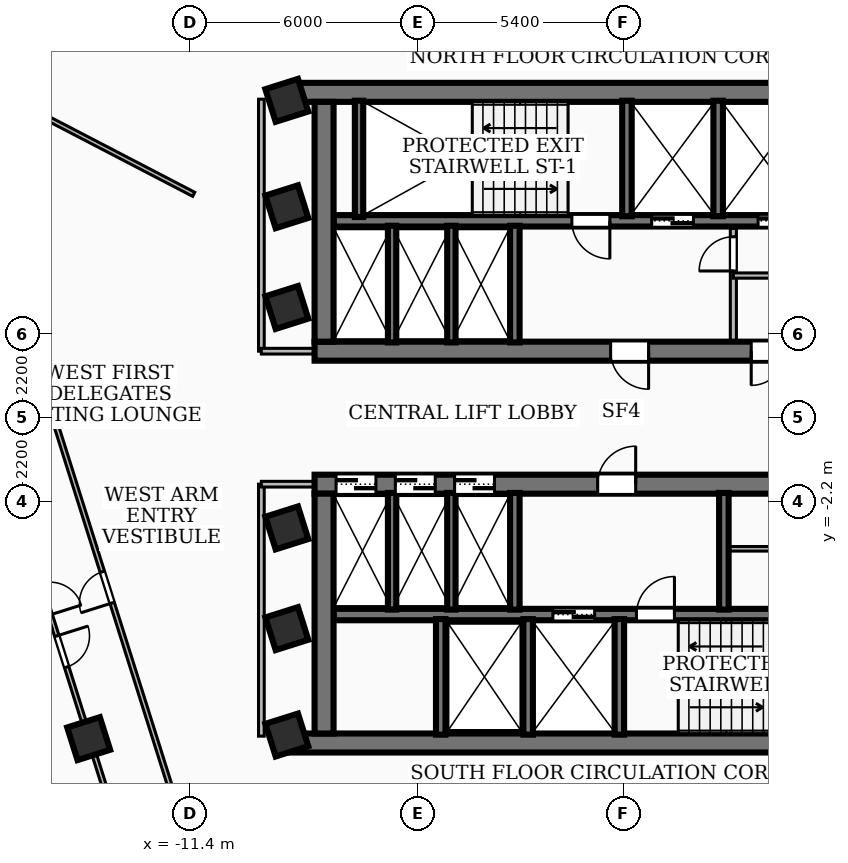
"""IFC4 building model, lengths in metres.
Left out: names, types, materials, properties, quantities, classifications, styles, units other than length and angle.
Written with IfcOpenShell. Run it as: python <this file> out.ifc"""

import sys

from ifc_helpers import new_model, si_unit, direction, frame, frame_2d, origin, origin_2d, place, context, subcontext, project, spatial, rectangle, extrude, element, fill, save


model = new_model("IFC4")
c1 = context("Model", 3, precision=1e-05, world=origin(), true_north=direction((0.0, 1.0)))
c2 = subcontext(c1, "Body", "Model", "MODEL_VIEW")
j1 = project(units=[si_unit("LENGTHUNIT", "METRE"), si_unit("PLANEANGLEUNIT", "RADIAN")], contexts=[c1])
p1 = place(None, origin())
s1 = spatial("IfcSite", under=j1, at=p1, CompositionType="ELEMENT")
p2 = place(p1, origin())
s2 = spatial("IfcBuilding", under=s1, at=p2, CompositionType="ELEMENT")
p3 = place(p2, frame((0.0, 0.0, 152.28)))
s3 = spatial("IfcBuildingStorey", under=s2, at=p3, CompositionType="ELEMENT", Elevation=152.28)
p4 = place(p3, frame((-8.78, 8.56, 0.0), z_axis=(0.0, 0.0, 1.0), x_axis=(1.0, 0.0, 0.0)))
e1 = element("IfcWall", 1, at=p4, inside=s3, PredefinedType="SHEAR", context=c2, shape_type="SweptSolid", body=[
    extrude(rectangle(XDim=17.56, YDim=0.5, at=frame_2d((8.78, 0.0))), origin(), (0.0, 0.0, 1.0), 3.34),
])
p5 = place(p3, frame((8.12, 1.75, 0.0), z_axis=(0.0, 0.0, 1.0), x_axis=(-1.0, 0.0, 0.0)))
e2 = element("IfcWall", 2, at=p5, inside=s3, PredefinedType="SHEAR", context=c2, shape_type="SweptSolid", body=[
    extrude(rectangle(XDim=16.24, YDim=0.5, at=frame_2d((8.12, 0.0))), origin(), (0.0, 0.0, 1.0), 3.34),
])
p6 = place(p5, frame((7.45, 0.0, 0.0)))
e3 = element("IfcOpeningElement", 3, at=p6, cuts=e2, PredefinedType="OPENING", context=c2, shape_type="SweptSolid", body=[
    extrude(rectangle(XDim=1.0, YDim=2.1, at=frame_2d((0.5, 1.05))), frame((0.0, 0.26, 0.0), z_axis=(0.0, -1.0, 0.0), x_axis=(1.0, 0.0, 0.0)), (0.0, 0.0, 1.0), 0.52),
])
p7 = place(p5, frame((3.85, 0.0, 0.0)))
e4 = element("IfcOpeningElement", 4, at=p7, cuts=e2, PredefinedType="OPENING", context=c2, shape_type="SweptSolid", body=[
    extrude(rectangle(XDim=0.9, YDim=2.06, at=frame_2d((0.45, 1.03))), frame((0.0, 0.26, 0.0), z_axis=(0.0, -1.0, 0.0), x_axis=(1.0, 0.0, 0.0)), (0.0, 0.0, 1.0), 0.52),
])
p8 = place(p5, frame((2.35, 0.0, 0.0)))
e5 = element("IfcOpeningElement", 5, at=p8, cuts=e2, PredefinedType="OPENING", context=c2, shape_type="SweptSolid", body=[
    extrude(rectangle(XDim=0.9, YDim=2.06, at=frame_2d((0.45, 1.03))), frame((0.0, 0.26, 0.0), z_axis=(0.0, -1.0, 0.0), x_axis=(1.0, 0.0, 0.0)), (0.0, 0.0, 1.0), 0.52),
])
p9 = place(p5, frame((0.8, 0.0, 0.0)))
e6 = element("IfcOpeningElement", 6, at=p9, cuts=e2, PredefinedType="OPENING", context=c2, shape_type="SweptSolid", body=[
    extrude(rectangle(XDim=0.9, YDim=2.06, at=frame_2d((0.45, 1.03))), frame((0.0, 0.26, 0.0), z_axis=(0.0, -1.0, 0.0), x_axis=(1.0, 0.0, 0.0)), (0.0, 0.0, 1.0), 0.52),
])
p10 = place(p3, frame((-7.87, 2.0, 0.0), z_axis=(0.0, 0.0, 1.0), x_axis=(0.0, 1.0, 0.0)))
e7 = element("IfcWall", 7, at=p10, inside=s3, PredefinedType="SHEAR", context=c2, shape_type="SweptSolid", body=[
    extrude(rectangle(XDim=6.31, YDim=0.5, at=frame_2d((3.155, 0.0))), origin(), (0.0, 0.0, 1.0), 3.34),
])
p11 = place(p3, frame((7.62, 5.18, 0.0), z_axis=(0.0, 0.0, 1.0), x_axis=(-1.0, 0.0, 0.0)))
e8 = element("IfcWall", 8, at=p11, inside=s3, PredefinedType="SOLIDWALL", context=c2, shape_type="SweptSolid", body=[
    extrude(rectangle(XDim=15.24, YDim=0.3, at=frame_2d((7.62, 0.0))), origin(), (0.0, 0.0, 1.0), 3.34),
])
p12 = place(p11, frame((5.77, 0.0, 0.0)))
e9 = element("IfcOpeningElement", 9, at=p12, cuts=e8, PredefinedType="OPENING", context=c2, shape_type="SweptSolid", body=[
    extrude(rectangle(XDim=1.1, YDim=2.15, at=frame_2d((0.55, 1.075))), frame((0.0, 0.16, 0.0), z_axis=(0.0, -1.0, 0.0), x_axis=(1.0, 0.0, 0.0)), (0.0, 0.0, 1.0), 0.32),
])
p13 = place(p11, frame((2.97, 0.0, 0.0)))
e10 = element("IfcOpeningElement", 10, at=p13, cuts=e8, PredefinedType="OPENING", context=c2, shape_type="SweptSolid", body=[
    extrude(rectangle(XDim=1.1, YDim=2.15, at=frame_2d((0.55, 1.075))), frame((0.0, 0.16, 0.0), z_axis=(0.0, -1.0, 0.0), x_axis=(1.0, 0.0, 0.0)), (0.0, 0.0, 1.0), 0.32),
])
p14 = place(p11, frame((7.97, 0.0, 0.0)))
e11 = element("IfcOpeningElement", 11, at=p14, cuts=e8, PredefinedType="OPENING", context=c2, shape_type="SweptSolid", body=[
    extrude(rectangle(XDim=1.0, YDim=2.1, at=frame_2d((0.5, 1.05))), frame((0.0, 0.16, 0.0), z_axis=(0.0, -1.0, 0.0), x_axis=(1.0, 0.0, 0.0)), (0.0, 0.0, 1.0), 0.32),
])
p15 = place(p3, frame((8.78, -8.56, 0.0), z_axis=(0.0, 0.0, 1.0), x_axis=(-1.0, 0.0, 0.0)))
e12 = element("IfcWall", 12, at=p15, inside=s3, PredefinedType="SHEAR", context=c2, shape_type="SweptSolid", body=[
    extrude(rectangle(XDim=17.56, YDim=0.5, at=frame_2d((8.78, 0.0))), origin(), (0.0, 0.0, 1.0), 3.34),
])
p16 = place(p3, frame((-8.12, -1.75, 0.0), z_axis=(0.0, 0.0, 1.0), x_axis=(1.0, 0.0, 0.0)))
e13 = element("IfcWall", 13, at=p16, inside=s3, PredefinedType="SHEAR", context=c2, shape_type="SweptSolid", body=[
    extrude(rectangle(XDim=16.24, YDim=0.5, at=frame_2d((8.12, 0.0))), origin(), (0.0, 0.0, 1.0), 3.34),
])
p17 = place(p16, frame((7.45, 0.0, 0.0)))
e14 = element("IfcOpeningElement", 14, at=p17, cuts=e13, PredefinedType="OPENING", context=c2, shape_type="SweptSolid", body=[
    extrude(rectangle(XDim=1.0, YDim=2.1, at=frame_2d((0.5, 1.05))), frame((0.0, 0.26, 0.0), z_axis=(0.0, -1.0, 0.0), x_axis=(1.0, 0.0, 0.0)), (0.0, 0.0, 1.0), 0.52),
])
p18 = place(p16, frame((12.65, 0.0, 0.0)))
e15 = element("IfcOpeningElement", 15, at=p18, cuts=e13, PredefinedType="OPENING", context=c2, shape_type="SweptSolid", body=[
    extrude(rectangle(XDim=0.9, YDim=2.06, at=frame_2d((0.45, 1.03))), frame((0.0, 0.26, 0.0), z_axis=(0.0, -1.0, 0.0), x_axis=(1.0, 0.0, 0.0)), (0.0, 0.0, 1.0), 0.52),
])
p19 = place(p16, frame((0.565, 0.0, 0.0)))
e16 = element("IfcOpeningElement", 16, at=p19, cuts=e13, PredefinedType="OPENING", context=c2, shape_type="SweptSolid", body=[
    extrude(rectangle(XDim=1.05, YDim=2.15, at=frame_2d((0.525, 1.075))), frame((0.0, 0.26, 0.0), z_axis=(0.0, -1.0, 0.0), x_axis=(1.0, 0.0, 0.0)), (0.0, 0.0, 1.0), 0.52),
])
p20 = place(p16, frame((2.125, 0.0, 0.0)))
e17 = element("IfcOpeningElement", 17, at=p20, cuts=e13, PredefinedType="OPENING", context=c2, shape_type="SweptSolid", body=[
    extrude(rectangle(XDim=1.05, YDim=2.15, at=frame_2d((0.525, 1.075))), frame((0.0, 0.26, 0.0), z_axis=(0.0, -1.0, 0.0), x_axis=(1.0, 0.0, 0.0)), (0.0, 0.0, 1.0), 0.52),
])
p21 = place(p16, frame((3.685, 0.0, 0.0)))
e18 = element("IfcOpeningElement", 18, at=p21, cuts=e13, PredefinedType="OPENING", context=c2, shape_type="SweptSolid", body=[
    extrude(rectangle(XDim=1.05, YDim=2.15, at=frame_2d((0.525, 1.075))), frame((0.0, 0.26, 0.0), z_axis=(0.0, -1.0, 0.0), x_axis=(1.0, 0.0, 0.0)), (0.0, 0.0, 1.0), 0.52),
])
p22 = place(p3, frame((-7.87, -8.31, 0.0), z_axis=(0.0, 0.0, 1.0), x_axis=(0.0, 1.0, 0.0)))
e19 = element("IfcWall", 19, at=p22, inside=s3, PredefinedType="SHEAR", context=c2, shape_type="SweptSolid", body=[
    extrude(rectangle(XDim=6.31, YDim=0.5, at=frame_2d((3.155, 0.0))), origin(), (0.0, 0.0, 1.0), 3.34),
])
p23 = place(p3, frame((-7.62, -5.18, 0.0), z_axis=(0.0, 0.0, 1.0), x_axis=(1.0, 0.0, 0.0)))
e20 = element("IfcWall", 20, at=p23, inside=s3, PredefinedType="SOLIDWALL", context=c2, shape_type="SweptSolid", body=[
    extrude(rectangle(XDim=15.24, YDim=0.3, at=frame_2d((7.62, 0.0))), origin(), (0.0, 0.0, 1.0), 3.34),
])
p24 = place(p23, frame((5.77, 0.0, 0.0)))
e21 = element("IfcOpeningElement", 21, at=p24, cuts=e20, PredefinedType="OPENING", context=c2, shape_type="SweptSolid", body=[
    extrude(rectangle(XDim=1.1, YDim=2.15, at=frame_2d((0.55, 1.075))), frame((0.0, 0.16, 0.0), z_axis=(0.0, -1.0, 0.0), x_axis=(1.0, 0.0, 0.0)), (0.0, 0.0, 1.0), 0.32),
])
p25 = place(p23, frame((7.97, 0.0, 0.0)))
e22 = element("IfcOpeningElement", 22, at=p25, cuts=e20, PredefinedType="OPENING", context=c2, shape_type="SweptSolid", body=[
    extrude(rectangle(XDim=1.0, YDim=2.1, at=frame_2d((0.5, 1.05))), frame((0.0, 0.16, 0.0), z_axis=(0.0, -1.0, 0.0), x_axis=(1.0, 0.0, 0.0)), (0.0, 0.0, 1.0), 0.32),
])
p26 = place(p3, frame((-6.95, 5.28, 0.0), z_axis=(0.0, 0.0, 1.0), x_axis=(0.0, 1.0, 0.0)))
e23 = element("IfcWall", 23, at=p26, inside=s3, PredefinedType="SOLIDWALL", context=c2, shape_type="SweptSolid", body=[
    extrude(rectangle(XDim=3.06, YDim=0.22, at=frame_2d((1.53, 0.0))), origin(), (0.0, 0.0, 1.0), 3.34),
])
for number, where, z_axis, x_axis in (
    (24, (0.1, 5.3, 0.0), (0.0, 0.0, 1.0), (0.0, 1.0, 0.0)),
    (25, (2.5, 5.3, 0.0), (0.0, 0.0, 1.0), (0.0, 1.0, 0.0)),
):
    element("IfcWall", number, at=place(p3, frame(where, z_axis=z_axis, x_axis=x_axis)), inside=s3, PredefinedType="SOLIDWALL", context=c2, shape_type="SweptSolid", body=[
        extrude(rectangle(XDim=3.04, YDim=0.25, at=frame_2d((1.52, 0.0))), origin(), (0.0, 0.0, 1.0), 3.34),
    ])
p27 = place(p3, frame((-2.85, 1.98, 0.0), z_axis=(0.0, 0.0, 1.0), x_axis=(0.0, 1.0, 0.0)))
e26 = element("IfcWall", 26, at=p27, inside=s3, PredefinedType="SOLIDWALL", context=c2, shape_type="SweptSolid", body=[
    extrude(rectangle(XDim=3.07, YDim=0.25, at=frame_2d((1.535, 0.0))), origin(), (0.0, 0.0, 1.0), 3.34),
])
for number, where, z_axis, x_axis in (
    (27, (-0.1, -8.34, 0.0), (0.0, 0.0, 1.0), (0.0, 1.0, 0.0)),
    (28, (-2.5, -8.34, 0.0), (0.0, 0.0, 1.0), (0.0, 1.0, 0.0)),
    (29, (-4.8, -8.34, 0.0), (0.0, 0.0, 1.0), (0.0, 1.0, 0.0)),
):
    element("IfcWall", number, at=place(p3, frame(where, z_axis=z_axis, x_axis=x_axis)), inside=s3, PredefinedType="SOLIDWALL", context=c2, shape_type="SweptSolid", body=[
        extrude(rectangle(XDim=3.04, YDim=0.25, at=frame_2d((1.52, 0.0))), origin(), (0.0, 0.0, 1.0), 3.34),
    ])
for number, where, z_axis, x_axis in (
    (30, (-2.85, -5.05, 0.0), (0.0, 0.0, 1.0), (0.0, 1.0, 0.0)),
    (31, (2.65, -5.05, 0.0), (0.0, 0.0, 1.0), (0.0, 1.0, 0.0)),
):
    element("IfcWall", number, at=place(p3, frame(where, z_axis=z_axis, x_axis=x_axis)), inside=s3, PredefinedType="SOLIDWALL", context=c2, shape_type="SweptSolid", body=[
        extrude(rectangle(XDim=3.07, YDim=0.25, at=frame_2d((1.535, 0.0))), origin(), (0.0, 0.0, 1.0), 3.34),
    ])
for number, where, z_axis, x_axis in (
    (32, (-6.08, 1.98, 0.0), (0.0, 0.0, 1.0), (0.0, 1.0, 0.0)),
    (33, (-4.52, 1.98, 0.0), (0.0, 0.0, 1.0), (0.0, 1.0, 0.0)),
    (34, (-6.08, -5.05, 0.0), (0.0, 0.0, 1.0), (0.0, 1.0, 0.0)),
    (35, (-4.52, -5.05, 0.0), (0.0, 0.0, 1.0), (0.0, 1.0, 0.0)),
):
    element("IfcWall", number, at=place(p3, frame(where, z_axis=z_axis, x_axis=x_axis)), inside=s3, PredefinedType="SOLIDWALL", context=c2, shape_type="SweptSolid", body=[
        extrude(rectangle(XDim=3.07, YDim=0.22, at=frame_2d((1.535, 0.0))), origin(), (0.0, 0.0, 1.0), 3.34),
    ])
for number, where, z_axis, x_axis in (
    (36, (-8.85, -5.55, 0.0), (0.0, 0.0, 1.0), (0.954, 0.301, 0.0)),
    (37, (-8.85, -2.9, 0.0), (0.0, 0.0, 1.0), (0.954, 0.301, 0.0)),
    (38, (-8.85, 2.9, 0.0), (0.0, 0.0, 1.0), (0.954, 0.301, 0.0)),
    (39, (-8.85, 5.55, 0.0), (0.0, 0.0, 1.0), (0.954, 0.301, 0.0)),
    (40, (-8.85, 8.35, 0.0), (0.0, 0.0, 1.0), (0.954, 0.301, 0.0)),
    (41, (-8.85, -8.35, 0.0), (0.0, 0.0, 1.0), (0.954, 0.301, 0.0)),
    (42, (-14.064, -8.445, 0.0), (0.0, 0.0, 1.0), (0.954, 0.301, 0.0)),
):
    element("IfcColumn", number, at=place(p3, frame(where, z_axis=z_axis, x_axis=x_axis)), inside=s3, PredefinedType="COLUMN", context=c2, shape_type="SweptSolid", body=[
        extrude(rectangle(XDim=0.9, YDim=0.9, at=origin_2d()), origin(), (0.0, 0.0, 1.0), 3.6),
    ])
p28 = place(p3, frame((2.9, 2.04, 0.0), z_axis=(0.0, 0.0, 1.0), x_axis=(0.0, 1.0, 0.0)))
e43 = element("IfcWall", 43, at=p28, inside=s3, PredefinedType="PARTITIONING", context=c2, shape_type="SweptSolid", body=[
    extrude(rectangle(XDim=2.94, YDim=0.16, at=frame_2d((1.47, 0.0))), origin(), (0.0, 0.0, 1.0), 2.57),
])
p29 = place(p28, frame((1.82, 0.0, 0.0)))
e44 = element("IfcOpeningElement", 44, at=p29, cuts=e43, PredefinedType="OPENING", context=c2, shape_type="SweptSolid", body=[
    extrude(rectangle(XDim=0.9, YDim=2.06, at=frame_2d((0.45, 1.03))), frame((0.0, 0.09, 0.0), z_axis=(0.0, -1.0, 0.0), x_axis=(1.0, 0.0, 0.0)), (0.0, 0.0, 1.0), 0.18),
])
p30 = place(p3, frame((2.9, 3.74, 0.0), z_axis=(0.0, 0.0, 1.0), x_axis=(1.0, 0.0, 0.0)))
e45 = element("IfcWall", 45, at=p30, inside=s3, PredefinedType="PARTITIONING", context=c2, shape_type="SweptSolid", body=[
    extrude(rectangle(XDim=4.65, YDim=0.138, at=frame_2d((2.325, 0.0))), origin(), (0.0, 0.0, 1.0), 3.34),
])
p31 = place(p3, frame((2.8, -3.45, 0.0), z_axis=(0.0, 0.0, 1.0), x_axis=(1.0, 0.0, 0.0)))
e46 = element("IfcWall", 46, at=p31, inside=s3, PredefinedType="PARTITIONING", context=c2, shape_type="SweptSolid", body=[
    extrude(rectangle(XDim=4.68, YDim=0.12, at=frame_2d((2.34, 0.0))), origin(), (0.0, 0.0, 1.0), 3.34),
])
p32 = place(p31, frame((1.9, 0.0, 0.0)))
e47 = element("IfcOpeningElement", 47, at=p32, cuts=e46, PredefinedType="OPENING", context=c2, shape_type="SweptSolid", body=[
    extrude(rectangle(XDim=0.86, YDim=2.04, at=frame_2d((0.43, 1.02))), frame((0.0, 0.07, 0.0), z_axis=(0.0, -1.0, 0.0), x_axis=(1.0, 0.0, 0.0)), (0.0, 0.0, 1.0), 0.14),
])
p33 = place(p3, frame((-9.52, 1.75, 0.0), z_axis=(0.0, 0.0, 1.0), x_axis=(0.0, 1.0, 0.0)))
e48 = element("IfcWall", 48, at=p33, inside=s3, PredefinedType="PARTITIONING", context=c2, shape_type="SweptSolid", body=[
    extrude(rectangle(XDim=6.63, YDim=0.15, at=frame_2d((3.315, 0.0))), origin(), (0.0, 0.0, 1.0), 2.152),
])
p34 = place(p3, frame((-7.85, 1.75, 0.0), z_axis=(0.0, 0.0, 1.0), x_axis=(-1.0, 0.0, 0.0)))
e49 = element("IfcWall", 49, at=p34, inside=s3, PredefinedType="PARTITIONING", context=c2, shape_type="SweptSolid", body=[
    extrude(rectangle(XDim=1.67, YDim=0.15, at=frame_2d((0.835, 0.0))), origin(), (0.0, 0.0, 1.0), 2.57),
])
p35 = place(p3, frame((-9.52, -8.38, 0.0), z_axis=(0.0, 0.0, 1.0), x_axis=(0.0, 1.0, 0.0)))
e50 = element("IfcWall", 50, at=p35, inside=s3, PredefinedType="PARTITIONING", context=c2, shape_type="SweptSolid", body=[
    extrude(rectangle(XDim=6.63, YDim=0.15, at=frame_2d((3.315, 0.0))), origin(), (0.0, 0.0, 1.0), 2.152),
])
p36 = place(p3, frame((-7.85, -1.75, 0.0), z_axis=(0.0, 0.0, 1.0), x_axis=(-1.0, 0.0, 0.0)))
e51 = element("IfcWall", 51, at=p36, inside=s3, PredefinedType="PARTITIONING", context=c2, shape_type="SweptSolid", body=[
    extrude(rectangle(XDim=1.67, YDim=0.15, at=frame_2d((0.835, 0.0))), origin(), (0.0, 0.0, 1.0), 2.57),
])
p37 = place(p3, frame((-11.3, 5.877, 0.0), z_axis=(0.0, 0.0, 1.0), x_axis=(-0.887198362964, 0.461388193123, 0.0)))
e52 = element("IfcWall", 52, at=p37, inside=s3, PredefinedType="PARTITIONING", context=c2, shape_type="SweptSolid", body=[
    extrude(rectangle(XDim=6.938, YDim=0.12, at=frame_2d((3.469, 0.0))), origin(), (0.0, 0.0, 1.0), 3.34),
])
p38 = place(p3, frame((-10.379, -14.591, 0.0), z_axis=(0.0, 0.0, 1.0), x_axis=(-0.301070726534, 0.95360181293, 0.0)))
e53 = element("IfcWall", 53, at=p38, inside=s3, PredefinedType="PARTITIONING", context=c2, shape_type="SweptSolid", body=[
    extrude(rectangle(XDim=20.81, YDim=0.12, at=frame_2d((10.405, 0.0))), origin(), (0.0, 0.0, 1.0), 2.152),
])
p39 = place(p38, frame((10.189, 0.0, 0.0)))
e54 = element("IfcOpeningElement", 54, at=p39, cuts=e53, PredefinedType="OPENING", context=c2, shape_type="SweptSolid", body=[
    extrude(rectangle(XDim=0.86, YDim=2.0, at=frame_2d((0.43, 1.0))), frame((0.0, 0.07, 0.0), z_axis=(0.0, -1.0, 0.0), x_axis=(1.0, 0.0, 0.0)), (0.0, 0.0, 1.0), 0.14),
])
p40 = place(p3, frame((-17.303, 1.863, 0.0), z_axis=(0.0, 0.0, 1.0), x_axis=(0.300972919735, -0.953632686933, 0.0)))
e55 = element("IfcWall", 55, at=p40, inside=s3, PredefinedType="PARTITIONING", context=c2, shape_type="SweptSolid", body=[
    extrude(rectangle(XDim=13.2, YDim=0.12, at=frame_2d((6.6, 0.0))), origin(), (0.0, 0.0, 1.0), 2.152),
])
p41 = place(p40, frame((6.534, 0.0, 0.0)))
e56 = element("IfcOpeningElement", 56, at=p41, cuts=e55, PredefinedType="OPENING", context=c2, shape_type="SweptSolid", body=[
    extrude(rectangle(XDim=0.86, YDim=2.04, at=frame_2d((0.43, 1.02))), frame((0.0, 0.07, 0.0), z_axis=(0.0, -1.0, 0.0), x_axis=(1.0, 0.0, 0.0)), (0.0, 0.0, 1.0), 0.14),
])
p42 = place(p40, frame((7.975, 0.0, 0.0)))
e57 = element("IfcOpeningElement", 57, at=p42, cuts=e55, PredefinedType="OPENING", context=c2, shape_type="SweptSolid", body=[
    extrude(rectangle(XDim=0.86, YDim=2.04, at=frame_2d((0.43, 1.02))), frame((0.0, 0.07, 0.0), z_axis=(0.0, -1.0, 0.0), x_axis=(1.0, 0.0, 0.0)), (0.0, 0.0, 1.0), 0.14),
])
p43 = place(p6, origin())
e58 = element("IfcDoor", 58, at=p43, inside=s3, OperationType="SINGLE_SWING_LEFT", PredefinedType="DOOR", context=c2, shape_type="SweptSolid", body=[
    extrude(rectangle(XDim=1.0, YDim=2.1, at=frame_2d((0.5, 1.05))), frame((0.0, 0.025, 0.0), z_axis=(0.0, -1.0, 0.0), x_axis=(1.0, 0.0, 0.0)), (0.0, 0.0, 1.0), 0.05),
])
fill(e3, e58)
p44 = place(p17, origin())
e59 = element("IfcDoor", 59, at=p44, inside=s3, OperationType="SINGLE_SWING_RIGHT", PredefinedType="DOOR", context=c2, shape_type="SweptSolid", body=[
    extrude(rectangle(XDim=1.0, YDim=2.1, at=frame_2d((0.5, 1.05))), frame((0.0, 0.025, 0.0), z_axis=(0.0, -1.0, 0.0), x_axis=(1.0, 0.0, 0.0)), (0.0, 0.0, 1.0), 0.05),
])
fill(e14, e59)
p45 = place(p12, origin())
e60 = element("IfcDoor", 60, at=p45, inside=s3, OperationType="DOUBLE_DOOR_SLIDING", PredefinedType="DOOR", context=c2, shape_type="SweptSolid", body=[
    extrude(rectangle(XDim=1.1, YDim=2.15, at=frame_2d((0.55, 1.075))), frame((0.0, 0.025, 0.0), z_axis=(0.0, -1.0, 0.0), x_axis=(1.0, 0.0, 0.0)), (0.0, 0.0, 1.0), 0.05),
])
fill(e9, e60)
p46 = place(p13, origin())
e61 = element("IfcDoor", 61, at=p46, inside=s3, OperationType="DOUBLE_DOOR_SLIDING", PredefinedType="DOOR", context=c2, shape_type="SweptSolid", body=[
    extrude(rectangle(XDim=1.1, YDim=2.15, at=frame_2d((0.55, 1.075))), frame((0.0, 0.025, 0.0), z_axis=(0.0, -1.0, 0.0), x_axis=(1.0, 0.0, 0.0)), (0.0, 0.0, 1.0), 0.05),
])
fill(e10, e61)
p47 = place(p14, origin())
e62 = element("IfcDoor", 62, at=p47, inside=s3, OperationType="SINGLE_SWING_LEFT", PredefinedType="DOOR", context=c2, shape_type="SweptSolid", body=[
    extrude(rectangle(XDim=1.0, YDim=2.1, at=frame_2d((0.5, 1.05))), frame((0.0, 0.025, 0.0), z_axis=(0.0, -1.0, 0.0), x_axis=(1.0, 0.0, 0.0)), (0.0, 0.0, 1.0), 0.05),
])
fill(e11, e62)
p48 = place(p24, origin())
e63 = element("IfcDoor", 63, at=p48, inside=s3, OperationType="DOUBLE_DOOR_SLIDING", PredefinedType="DOOR", context=c2, shape_type="SweptSolid", body=[
    extrude(rectangle(XDim=1.1, YDim=2.15, at=frame_2d((0.55, 1.075))), frame((0.0, 0.025, 0.0), z_axis=(0.0, -1.0, 0.0), x_axis=(1.0, 0.0, 0.0)), (0.0, 0.0, 1.0), 0.05),
])
fill(e21, e63)
p49 = place(p25, origin())
e64 = element("IfcDoor", 64, at=p49, inside=s3, OperationType="SINGLE_SWING_RIGHT", PredefinedType="DOOR", context=c2, shape_type="SweptSolid", body=[
    extrude(rectangle(XDim=1.0, YDim=2.1, at=frame_2d((0.5, 1.05))), frame((0.0, 0.025, 0.0), z_axis=(0.0, -1.0, 0.0), x_axis=(1.0, 0.0, 0.0)), (0.0, 0.0, 1.0), 0.05),
])
fill(e22, e64)
p50 = place(p19, origin())
e65 = element("IfcDoor", 65, at=p50, inside=s3, OperationType="DOUBLE_DOOR_SLIDING", PredefinedType="DOOR", context=c2, shape_type="SweptSolid", body=[
    extrude(rectangle(XDim=1.05, YDim=2.15, at=frame_2d((0.525, 1.075))), frame((0.0, 0.025, 0.0), z_axis=(0.0, -1.0, 0.0), x_axis=(1.0, 0.0, 0.0)), (0.0, 0.0, 1.0), 0.05),
])
fill(e16, e65)
p51 = place(p20, origin())
e66 = element("IfcDoor", 66, at=p51, inside=s3, OperationType="DOUBLE_DOOR_SLIDING", PredefinedType="DOOR", context=c2, shape_type="SweptSolid", body=[
    extrude(rectangle(XDim=1.05, YDim=2.15, at=frame_2d((0.525, 1.075))), frame((0.0, 0.025, 0.0), z_axis=(0.0, -1.0, 0.0), x_axis=(1.0, 0.0, 0.0)), (0.0, 0.0, 1.0), 0.05),
])
fill(e17, e66)
p52 = place(p21, origin())
e67 = element("IfcDoor", 67, at=p52, inside=s3, OperationType="DOUBLE_DOOR_SLIDING", PredefinedType="DOOR", context=c2, shape_type="SweptSolid", body=[
    extrude(rectangle(XDim=1.05, YDim=2.15, at=frame_2d((0.525, 1.075))), frame((0.0, 0.025, 0.0), z_axis=(0.0, -1.0, 0.0), x_axis=(1.0, 0.0, 0.0)), (0.0, 0.0, 1.0), 0.05),
])
fill(e18, e67)
p53 = place(p7, origin())
e68 = element("IfcDoor", 68, at=p53, inside=s3, OperationType="SINGLE_SWING_RIGHT", PredefinedType="DOOR", context=c2, shape_type="SweptSolid", body=[
    extrude(rectangle(XDim=0.9, YDim=2.06, at=frame_2d((0.45, 1.03))), frame((0.0, 0.025, 0.0), z_axis=(0.0, -1.0, 0.0), x_axis=(1.0, 0.0, 0.0)), (0.0, 0.0, 1.0), 0.05),
])
fill(e4, e68)
p54 = place(p29, origin())
e69 = element("IfcDoor", 69, at=p54, inside=s3, OperationType="SINGLE_SWING_LEFT", PredefinedType="DOOR", context=c2, shape_type="SweptSolid", body=[
    extrude(rectangle(XDim=0.9, YDim=2.06, at=frame_2d((0.45, 1.03))), frame((0.0, 0.025, 0.0), z_axis=(0.0, -1.0, 0.0), x_axis=(1.0, 0.0, 0.0)), (0.0, 0.0, 1.0), 0.05),
])
fill(e44, e69)
p55 = place(p39, origin())
e70 = element("IfcDoor", 70, at=p55, inside=s3, OperationType="SINGLE_SWING_LEFT", PredefinedType="DOOR", context=c2, shape_type="SweptSolid", body=[
    extrude(rectangle(XDim=0.86, YDim=2.0, at=frame_2d((0.43, 1.0))), frame((0.0, 0.025, 0.0), z_axis=(0.0, -1.0, 0.0), x_axis=(1.0, 0.0, 0.0)), (0.0, 0.0, 1.0), 0.05),
])
fill(e54, e70)
p56 = place(p42, origin())
e71 = element("IfcDoor", 71, at=p56, inside=s3, OperationType="SINGLE_SWING_LEFT", PredefinedType="DOOR", context=c2, shape_type="SweptSolid", body=[
    extrude(rectangle(XDim=0.86, YDim=2.04, at=frame_2d((0.43, 1.02))), frame((0.0, 0.025, 0.0), z_axis=(0.0, -1.0, 0.0), x_axis=(1.0, 0.0, 0.0)), (0.0, 0.0, 1.0), 0.05),
])
fill(e57, e71)
save(model, sys.argv[1])
